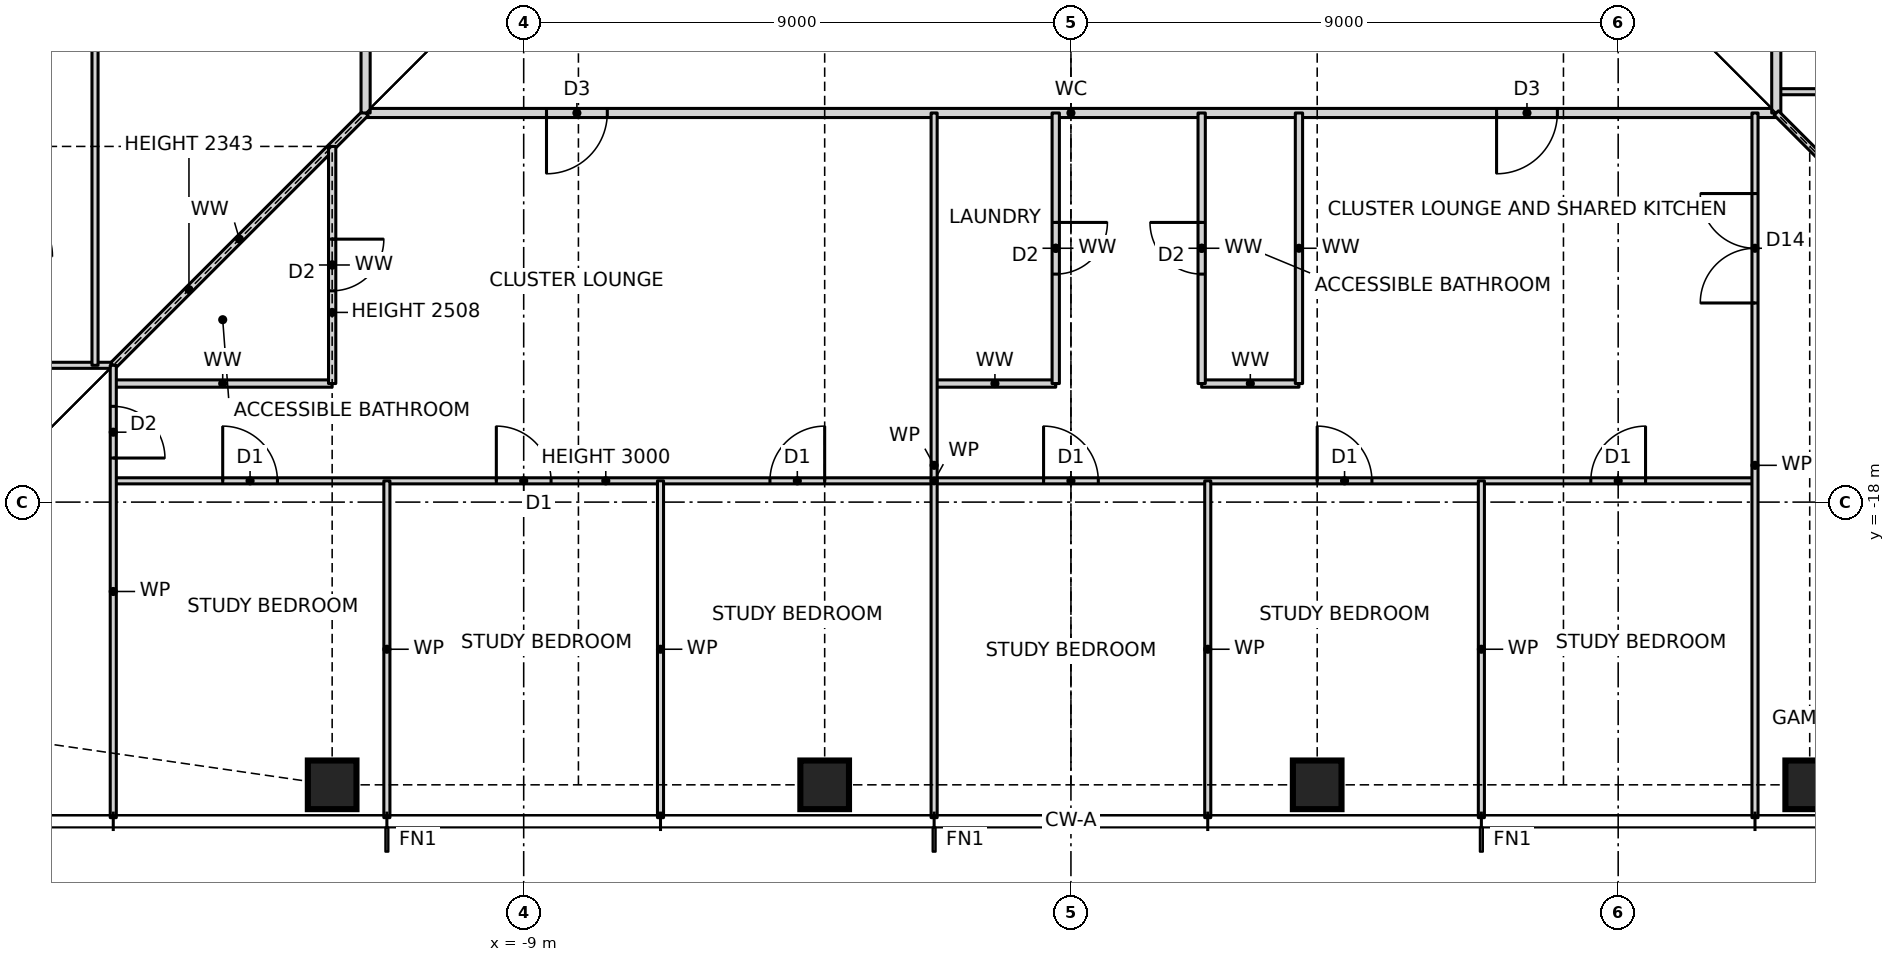
"""IFC4 building model, lengths in metres.
Left out: names, types, materials, properties, quantities, classifications, styles, units other than length and angle.
Written with IfcOpenShell. Run it as: python <this file> out.ifc"""

import sys

from ifc_helpers import new_model, si_unit, direction, frame, frame_2d, origin, origin_2d, place, context, subcontext, project, spatial, rectangle, hollow_rectangle, extrude, element, fill, save


model = new_model("IFC4")
c1 = context("Model", 3, precision=1e-05, world=origin(), true_north=direction((0.0, 1.0)))
c2 = subcontext(c1, "Body", "Model", "MODEL_VIEW")
j1 = project(units=[si_unit("LENGTHUNIT", "METRE"), si_unit("PLANEANGLEUNIT", "RADIAN")], contexts=[c1])
p1 = place(None, origin())
s1 = spatial("IfcSite", under=j1, at=p1, CompositionType="ELEMENT")
p2 = place(p1, origin())
s2 = spatial("IfcBuilding", under=s1, at=p2, CompositionType="ELEMENT")
p3 = place(p2, frame((0.0, 0.0, 43.0)))
s3 = spatial("IfcBuildingStorey", under=s2, at=p3, CompositionType="ELEMENT", Elevation=43.0)
for number, where, z_axis, x_axis in (
    (1, (-12.15, -22.65, 0.0), (0.0, 0.0, 1.0), (1.0, 0.0, 0.0)),
    (2, (-4.05, -22.65, 0.0), (0.0, 0.0, 1.0), (1.0, 0.0, 0.0)),
    (3, (4.05, -22.65, 0.0), (0.0, 0.0, 1.0), (1.0, 0.0, 0.0)),
    (4, (12.15, -22.65, 0.0), (0.0, 0.0, 1.0), (1.0, 0.0, 0.0)),
):
    element("IfcColumn", number, at=place(p3, frame(where, z_axis=z_axis, x_axis=x_axis)), inside=s3, PredefinedType="COLUMN", context=c2, shape_type="SweptSolid", body=[
        extrude(hollow_rectangle(XDim=0.8, YDim=0.8, WallThickness=0.09, at=origin_2d()), origin(), (0.0, 0.0, 1.0), 3.5),
    ])
p4 = place(p3, frame((-15.75, -17.65, 0.0), z_axis=(0.0, 0.0, 1.0), x_axis=(1.0, 0.0, 0.0)))
e5 = element("IfcWall", 5, at=p4, inside=s3, PredefinedType="PARTITIONING", context=c2, shape_type="SweptSolid", body=[
    extrude(rectangle(XDim=27.0, YDim=0.1, at=frame_2d((13.5, 0.0))), origin(), (0.0, 0.0, 1.0), 3.0),
])
p5 = place(p4, frame((1.8, 0.0, 0.0)))
e6 = element("IfcOpeningElement", 6, at=p5, cuts=e5, PredefinedType="OPENING", context=c2, shape_type="SweptSolid", body=[
    extrude(rectangle(XDim=0.9, YDim=2.1, at=frame_2d((0.45, 1.05))), frame((0.0, 0.06, 0.0), z_axis=(0.0, -1.0, 0.0), x_axis=(1.0, 0.0, 0.0)), (0.0, 0.0, 1.0), 0.12),
])
p6 = place(p4, frame((6.3, 0.0, 0.0)))
e7 = element("IfcOpeningElement", 7, at=p6, cuts=e5, PredefinedType="OPENING", context=c2, shape_type="SweptSolid", body=[
    extrude(rectangle(XDim=0.9, YDim=2.1, at=frame_2d((0.45, 1.05))), frame((0.0, 0.06, 0.0), z_axis=(0.0, -1.0, 0.0), x_axis=(1.0, 0.0, 0.0)), (0.0, 0.0, 1.0), 0.12),
])
p7 = place(p4, frame((10.8, 0.0, 0.0)))
e8 = element("IfcOpeningElement", 8, at=p7, cuts=e5, PredefinedType="OPENING", context=c2, shape_type="SweptSolid", body=[
    extrude(rectangle(XDim=0.9, YDim=2.1, at=frame_2d((0.45, 1.05))), frame((0.0, 0.06, 0.0), z_axis=(0.0, -1.0, 0.0), x_axis=(1.0, 0.0, 0.0)), (0.0, 0.0, 1.0), 0.12),
])
p8 = place(p4, frame((15.3, 0.0, 0.0)))
e9 = element("IfcOpeningElement", 9, at=p8, cuts=e5, PredefinedType="OPENING", context=c2, shape_type="SweptSolid", body=[
    extrude(rectangle(XDim=0.9, YDim=2.1, at=frame_2d((0.45, 1.05))), frame((0.0, 0.06, 0.0), z_axis=(0.0, -1.0, 0.0), x_axis=(1.0, 0.0, 0.0)), (0.0, 0.0, 1.0), 0.12),
])
p9 = place(p4, frame((19.8, 0.0, 0.0)))
e10 = element("IfcOpeningElement", 10, at=p9, cuts=e5, PredefinedType="OPENING", context=c2, shape_type="SweptSolid", body=[
    extrude(rectangle(XDim=0.9, YDim=2.1, at=frame_2d((0.45, 1.05))), frame((0.0, 0.06, 0.0), z_axis=(0.0, -1.0, 0.0), x_axis=(1.0, 0.0, 0.0)), (0.0, 0.0, 1.0), 0.12),
])
p10 = place(p4, frame((24.3, 0.0, 0.0)))
e11 = element("IfcOpeningElement", 11, at=p10, cuts=e5, PredefinedType="OPENING", context=c2, shape_type="SweptSolid", body=[
    extrude(rectangle(XDim=0.9, YDim=2.1, at=frame_2d((0.45, 1.05))), frame((0.0, 0.06, 0.0), z_axis=(0.0, -1.0, 0.0), x_axis=(1.0, 0.0, 0.0)), (0.0, 0.0, 1.0), 0.12),
])
p11 = place(p3, frame((-15.75, -16.05, 0.0), z_axis=(0.0, 0.0, 1.0), x_axis=(1.0, 0.0, 0.0)))
e12 = element("IfcWall", 12, at=p11, inside=s3, PredefinedType="PARTITIONING", context=c2, shape_type="SweptSolid", body=[
    extrude(rectangle(XDim=3.6, YDim=0.12, at=frame_2d((1.8, 0.0))), origin(), (0.0, 0.0, 1.0), 3.27),
])
p12 = place(p3, frame((-2.25, -16.05, 0.0), z_axis=(0.0, 0.0, 1.0), x_axis=(1.0, 0.0, 0.0)))
e13 = element("IfcWall", 13, at=p12, inside=s3, PredefinedType="PARTITIONING", context=c2, shape_type="SweptSolid", body=[
    extrude(rectangle(XDim=2.0, YDim=0.12, at=frame_2d((1.0, 0.0))), origin(), (0.0, 0.0, 1.0), 3.27),
])
p13 = place(p3, frame((2.15, -16.05, 0.0), z_axis=(0.0, 0.0, 1.0), x_axis=(1.0, 0.0, 0.0)))
e14 = element("IfcWall", 14, at=p13, inside=s3, PredefinedType="PARTITIONING", context=c2, shape_type="SweptSolid", body=[
    extrude(rectangle(XDim=1.6, YDim=0.12, at=frame_2d((0.8, 0.0))), origin(), (0.0, 0.0, 1.0), 3.27),
])
p14 = place(p3, frame((-23.19, -15.75, 0.0), z_axis=(0.0, 0.0, 1.0), x_axis=(1.0, 0.0, 0.0)))
e15 = element("IfcWall", 15, at=p14, inside=s3, PredefinedType="PARTITIONING", context=c2, shape_type="SweptSolid", body=[
    extrude(rectangle(XDim=7.44, YDim=0.1, at=frame_2d((3.72, 0.0))), origin(), (0.0, 0.0, 1.0), 3.27),
])
p15 = place(p3, frame((-11.6, -11.6, 0.0), z_axis=(0.0, 0.0, 1.0), x_axis=(1.0, 0.0, 0.0)))
e16 = element("IfcWall", 16, at=p15, inside=s3, PredefinedType="PARTITIONING", context=c2, shape_type="SweptSolid", body=[
    extrude(rectangle(XDim=23.2, YDim=0.15, at=frame_2d((11.6, 0.0))), origin(), (0.0, 0.0, 1.0), 3.27),
])
p16 = place(p15, frame((2.975, 0.0, 0.0)))
e17 = element("IfcOpeningElement", 17, at=p16, cuts=e16, PredefinedType="OPENING", context=c2, shape_type="SweptSolid", body=[
    extrude(rectangle(XDim=1.0, YDim=2.1, at=frame_2d((0.5, 1.05))), frame((0.0, 0.085, 0.0), z_axis=(0.0, -1.0, 0.0), x_axis=(1.0, 0.0, 0.0)), (0.0, 0.0, 1.0), 0.17),
])
p17 = place(p15, frame((18.6, 0.0, 0.0)))
e18 = element("IfcOpeningElement", 18, at=p17, cuts=e16, PredefinedType="OPENING", context=c2, shape_type="SweptSolid", body=[
    extrude(rectangle(XDim=1.0, YDim=2.1, at=frame_2d((0.5, 1.05))), frame((0.0, 0.085, 0.0), z_axis=(0.0, -1.0, 0.0), x_axis=(1.0, 0.0, 0.0)), (0.0, 0.0, 1.0), 0.17),
])
p18 = place(p3, frame((11.6, -11.25, 0.0), z_axis=(0.0, 0.0, 1.0), x_axis=(1.0, 0.0, 0.0)))
e19 = element("IfcWall", 19, at=p18, inside=s3, PredefinedType="PARTITIONING", context=c2, shape_type="SweptSolid", body=[
    extrude(rectangle(XDim=11.59, YDim=0.1, at=frame_2d((5.795, 0.0))), origin(), (0.0, 0.0, 1.0), 3.27),
])
p19 = place(p18, frame((1.325, 0.0, 0.0)))
e20 = element("IfcOpeningElement", 20, at=p19, cuts=e19, PredefinedType="OPENING", context=c2, shape_type="SweptSolid", body=[
    extrude(rectangle(XDim=1.8, YDim=2.1, at=frame_2d((0.9, 1.05))), frame((0.0, 0.06, 0.0), z_axis=(0.0, -1.0, 0.0), x_axis=(1.0, 0.0, 0.0)), (0.0, 0.0, 1.0), 0.12),
])
p20 = place(p3, frame((-15.75, -15.75, 0.0), z_axis=(0.0, 0.0, 1.0), x_axis=(0.707106781187, 0.707106781187, 0.0)))
e21 = element("IfcWall", 21, at=p20, inside=s3, PredefinedType="PARTITIONING", context=c2, shape_type="SweptSolid", body=[
    extrude(rectangle(XDim=5.869, YDim=0.12, at=frame_2d((2.935, 0.0))), origin(), (0.0, 0.0, 1.0), 2.343),
])
p21 = place(p3, frame((11.6, -11.6, 0.0), z_axis=(0.0, 0.0, 1.0), x_axis=(0.0, 1.0, 0.0)))
e22 = element("IfcWall", 22, at=p21, inside=s3, PredefinedType="PARTITIONING", context=c2, shape_type="SweptSolid", body=[
    extrude(rectangle(XDim=24.2, YDim=0.15, at=frame_2d((12.1, 0.0))), origin(), (0.0, 0.0, 1.0), 3.27),
])
p22 = place(p21, frame((3.6, 0.0, 0.0)))
e23 = element("IfcOpeningElement", 23, at=p22, cuts=e22, PredefinedType="OPENING", context=c2, shape_type="SweptSolid", body=[
    extrude(rectangle(XDim=1.0, YDim=2.1, at=frame_2d((0.5, 1.05))), frame((0.0, 0.085, 0.0), z_axis=(0.0, -1.0, 0.0), x_axis=(1.0, 0.0, 0.0)), (0.0, 0.0, 1.0), 0.17),
])
p23 = place(p21, frame((21.025, 0.0, 0.0)))
e24 = element("IfcOpeningElement", 24, at=p23, cuts=e22, PredefinedType="OPENING", context=c2, shape_type="SweptSolid", body=[
    extrude(rectangle(XDim=1.0, YDim=2.1, at=frame_2d((0.5, 1.05))), frame((0.0, 0.085, 0.0), z_axis=(0.0, -1.0, 0.0), x_axis=(1.0, 0.0, 0.0)), (0.0, 0.0, 1.0), 0.17),
])
p24 = place(p3, frame((11.25, -23.19, 0.0), z_axis=(0.0, 0.0, 1.0), x_axis=(0.0, 1.0, 0.0)))
e25 = element("IfcWall", 25, at=p24, inside=s3, PredefinedType="PARTITIONING", context=c2, shape_type="SweptSolid", body=[
    extrude(rectangle(XDim=11.59, YDim=0.1, at=frame_2d((5.795, 0.0))), origin(), (0.0, 0.0, 1.0), 3.27),
])
p25 = place(p24, frame((8.465, 0.0, 0.0)))
e26 = element("IfcOpeningElement", 26, at=p25, cuts=e25, PredefinedType="OPENING", context=c2, shape_type="SweptSolid", body=[
    extrude(rectangle(XDim=1.8, YDim=2.1, at=frame_2d((0.9, 1.05))), frame((0.0, 0.06, 0.0), z_axis=(0.0, -1.0, 0.0), x_axis=(1.0, 0.0, 0.0)), (0.0, 0.0, 1.0), 0.12),
])
p26 = place(p3, frame((6.75, -23.19, 0.0), z_axis=(0.0, 0.0, 1.0), x_axis=(0.0, 1.0, 0.0)))
e27 = element("IfcWall", 27, at=p26, inside=s3, PredefinedType="PARTITIONING", context=c2, shape_type="SweptSolid", body=[
    extrude(rectangle(XDim=5.54, YDim=0.1, at=frame_2d((2.77, 0.0))), origin(), (0.0, 0.0, 1.0), 3.27),
])
p27 = place(p3, frame((3.75, -16.05, 0.0), z_axis=(0.0, 0.0, 1.0), x_axis=(0.0, 1.0, 0.0)))
e28 = element("IfcWall", 28, at=p27, inside=s3, PredefinedType="PARTITIONING", context=c2, shape_type="SweptSolid", body=[
    extrude(rectangle(XDim=4.45, YDim=0.12, at=frame_2d((2.225, 0.0))), origin(), (0.0, 0.0, 1.0), 3.27),
])
p28 = place(p3, frame((2.25, -23.19, 0.0), z_axis=(0.0, 0.0, 1.0), x_axis=(0.0, 1.0, 0.0)))
e29 = element("IfcWall", 29, at=p28, inside=s3, PredefinedType="PARTITIONING", context=c2, shape_type="SweptSolid", body=[
    extrude(rectangle(XDim=5.54, YDim=0.1, at=frame_2d((2.77, 0.0))), origin(), (0.0, 0.0, 1.0), 3.27),
])
p29 = place(p3, frame((2.15, -16.05, 0.0), z_axis=(0.0, 0.0, 1.0), x_axis=(0.0, 1.0, 0.0)))
e30 = element("IfcWall", 30, at=p29, inside=s3, PredefinedType="PARTITIONING", context=c2, shape_type="SweptSolid", body=[
    extrude(rectangle(XDim=4.45, YDim=0.12, at=frame_2d((2.225, 0.0))), origin(), (0.0, 0.0, 1.0), 3.27),
])
p30 = place(p29, frame((1.8, 0.0, 0.0)))
e31 = element("IfcOpeningElement", 31, at=p30, cuts=e30, PredefinedType="OPENING", context=c2, shape_type="SweptSolid", body=[
    extrude(rectangle(XDim=0.85, YDim=2.1, at=frame_2d((0.425, 1.05))), frame((0.0, 0.07, 0.0), z_axis=(0.0, -1.0, 0.0), x_axis=(1.0, 0.0, 0.0)), (0.0, 0.0, 1.0), 0.14),
])
p31 = place(p3, frame((-0.25, -16.05, 0.0), z_axis=(0.0, 0.0, 1.0), x_axis=(0.0, 1.0, 0.0)))
e32 = element("IfcWall", 32, at=p31, inside=s3, PredefinedType="PARTITIONING", context=c2, shape_type="SweptSolid", body=[
    extrude(rectangle(XDim=4.45, YDim=0.12, at=frame_2d((2.225, 0.0))), origin(), (0.0, 0.0, 1.0), 3.27),
])
p32 = place(p31, frame((1.8, 0.0, 0.0)))
e33 = element("IfcOpeningElement", 33, at=p32, cuts=e32, PredefinedType="OPENING", context=c2, shape_type="SweptSolid", body=[
    extrude(rectangle(XDim=0.85, YDim=2.1, at=frame_2d((0.425, 1.05))), frame((0.0, 0.07, 0.0), z_axis=(0.0, -1.0, 0.0), x_axis=(1.0, 0.0, 0.0)), (0.0, 0.0, 1.0), 0.14),
])
p33 = place(p3, frame((-2.25, -23.19, 0.0), z_axis=(0.0, 0.0, 1.0), x_axis=(0.0, 1.0, 0.0)))
e34 = element("IfcWall", 34, at=p33, inside=s3, PredefinedType="PARTITIONING", context=c2, shape_type="SweptSolid", body=[
    extrude(rectangle(XDim=11.59, YDim=0.1, at=frame_2d((5.795, 0.0))), origin(), (0.0, 0.0, 1.0), 3.27),
])
for number, where, z_axis, x_axis in (
    (35, (-6.75, -23.19, 0.0), (0.0, 0.0, 1.0), (0.0, 1.0, 0.0)),
    (36, (-11.25, -23.19, 0.0), (0.0, 0.0, 1.0), (0.0, 1.0, 0.0)),
):
    element("IfcWall", number, at=place(p3, frame(where, z_axis=z_axis, x_axis=x_axis)), inside=s3, PredefinedType="PARTITIONING", context=c2, shape_type="SweptSolid", body=[
        extrude(rectangle(XDim=5.54, YDim=0.1, at=frame_2d((2.77, 0.0))), origin(), (0.0, 0.0, 1.0), 3.27),
    ])
p34 = place(p3, frame((-11.6, -11.6, 0.0), z_axis=(0.0, 0.0, 1.0), x_axis=(0.0, 1.0, 0.0)))
e37 = element("IfcWall", 37, at=p34, inside=s3, PredefinedType="PARTITIONING", context=c2, shape_type="SweptSolid", body=[
    extrude(rectangle(XDim=24.2, YDim=0.15, at=frame_2d((12.1, 0.0))), origin(), (0.0, 0.0, 1.0), 3.27),
])
p35 = place(p34, frame((12.14, 0.0, 0.0)))
e38 = element("IfcOpeningElement", 38, at=p35, cuts=e37, PredefinedType="OPENING", context=c2, shape_type="SweptSolid", body=[
    extrude(rectangle(XDim=1.0, YDim=2.1, at=frame_2d((0.5, 1.05))), frame((0.0, 0.085, 0.0), z_axis=(0.0, -1.0, 0.0), x_axis=(1.0, 0.0, 0.0)), (0.0, 0.0, 1.0), 0.17),
])
p36 = place(p3, frame((-12.15, -16.05, 0.0), z_axis=(0.0, 0.0, 1.0), x_axis=(0.0, 1.0, 0.0)))
e39 = element("IfcWall", 39, at=p36, inside=s3, PredefinedType="PARTITIONING", context=c2, shape_type="SweptSolid", body=[
    extrude(rectangle(XDim=3.9, YDim=0.12, at=frame_2d((1.95, 0.0))), origin(), (0.0, 0.0, 1.0), 2.508),
])
p37 = place(p36, frame((1.525, 0.0, 0.0)))
e40 = element("IfcOpeningElement", 40, at=p37, cuts=e39, PredefinedType="OPENING", context=c2, shape_type="SweptSolid", body=[
    extrude(rectangle(XDim=0.85, YDim=2.1, at=frame_2d((0.425, 1.05))), frame((0.0, 0.07, 0.0), z_axis=(0.0, -1.0, 0.0), x_axis=(1.0, 0.0, 0.0)), (0.0, 0.0, 1.0), 0.14),
])
p38 = place(p3, frame((-15.75, -23.19, 0.0), z_axis=(0.0, 0.0, 1.0), x_axis=(0.0, 1.0, 0.0)))
e41 = element("IfcWall", 41, at=p38, inside=s3, PredefinedType="PARTITIONING", context=c2, shape_type="SweptSolid", body=[
    extrude(rectangle(XDim=7.44, YDim=0.1, at=frame_2d((3.72, 0.0))), origin(), (0.0, 0.0, 1.0), 3.27),
])
p39 = place(p38, frame((5.915, 0.0, 0.0)))
e42 = element("IfcOpeningElement", 42, at=p39, cuts=e41, PredefinedType="OPENING", context=c2, shape_type="SweptSolid", body=[
    extrude(rectangle(XDim=0.85, YDim=2.1, at=frame_2d((0.425, 1.05))), frame((0.0, 0.06, 0.0), z_axis=(0.0, -1.0, 0.0), x_axis=(1.0, 0.0, 0.0)), (0.0, 0.0, 1.0), 0.12),
])
p40 = place(p3, frame((-16.05, -15.75, 0.0), z_axis=(0.0, 0.0, 1.0), x_axis=(0.0, 1.0, 0.0)))
e43 = element("IfcWall", 43, at=p40, inside=s3, PredefinedType="PARTITIONING", context=c2, shape_type="SweptSolid", body=[
    extrude(rectangle(XDim=14.08, YDim=0.1, at=frame_2d((7.04, 0.0))), origin(), (0.0, 0.0, 1.0), 3.27),
])
p41 = place(p40, frame((6.615, 0.0, 0.0)))
e44 = element("IfcOpeningElement", 44, at=p41, cuts=e43, PredefinedType="OPENING", context=c2, shape_type="SweptSolid", body=[
    extrude(rectangle(XDim=0.85, YDim=2.1, at=frame_2d((0.425, 1.05))), frame((0.0, 0.06, 0.0), z_axis=(0.0, -1.0, 0.0), x_axis=(1.0, 0.0, 0.0)), (0.0, 0.0, 1.0), 0.12),
])
p42 = place(p3, frame((15.75, -15.75, 0.0), z_axis=(0.0, 0.0, 1.0), x_axis=(-0.707106781187, 0.707106781187, 0.0)))
e45 = element("IfcWall", 45, at=p42, inside=s3, PredefinedType="PARTITIONING", context=c2, shape_type="SweptSolid", body=[
    extrude(rectangle(XDim=5.869, YDim=0.1, at=frame_2d((2.935, 0.0))), origin(), (0.0, 0.0, 1.0), 2.343),
])
p43 = place(p5, origin())
e46 = element("IfcDoor", 46, at=p43, inside=s3, OperationType="SINGLE_SWING_LEFT", PredefinedType="DOOR", context=c2, shape_type="SweptSolid", body=[
    extrude(rectangle(XDim=0.9, YDim=2.1, at=frame_2d((0.45, 1.05))), frame((0.0, 0.025, 0.0), z_axis=(0.0, -1.0, 0.0), x_axis=(1.0, 0.0, 0.0)), (0.0, 0.0, 1.0), 0.05),
])
fill(e6, e46)
p44 = place(p6, origin())
e47 = element("IfcDoor", 47, at=p44, inside=s3, OperationType="SINGLE_SWING_LEFT", PredefinedType="DOOR", context=c2, shape_type="SweptSolid", body=[
    extrude(rectangle(XDim=0.9, YDim=2.1, at=frame_2d((0.45, 1.05))), frame((0.0, 0.025, 0.0), z_axis=(0.0, -1.0, 0.0), x_axis=(1.0, 0.0, 0.0)), (0.0, 0.0, 1.0), 0.05),
])
fill(e7, e47)
p45 = place(p7, origin())
e48 = element("IfcDoor", 48, at=p45, inside=s3, OperationType="SINGLE_SWING_RIGHT", PredefinedType="DOOR", context=c2, shape_type="SweptSolid", body=[
    extrude(rectangle(XDim=0.9, YDim=2.1, at=frame_2d((0.45, 1.05))), frame((0.0, 0.025, 0.0), z_axis=(0.0, -1.0, 0.0), x_axis=(1.0, 0.0, 0.0)), (0.0, 0.0, 1.0), 0.05),
])
fill(e8, e48)
p46 = place(p16, frame((1.0, 0.0, 0.0), z_axis=(0.0, 0.0, 1.0), x_axis=(-1.0, 0.0, 0.0)))
e49 = element("IfcDoor", 49, at=p46, inside=s3, OperationType="SINGLE_SWING_RIGHT", PredefinedType="DOOR", context=c2, shape_type="SweptSolid", body=[
    extrude(rectangle(XDim=1.0, YDim=2.1, at=frame_2d((0.5, 1.05))), frame((0.0, 0.025, 0.0), z_axis=(0.0, -1.0, 0.0), x_axis=(1.0, 0.0, 0.0)), (0.0, 0.0, 1.0), 0.05),
])
fill(e17, e49)
p47 = place(p37, frame((0.85, 0.0, 0.0), z_axis=(0.0, 0.0, 1.0), x_axis=(-1.0, 0.0, 0.0)))
e50 = element("IfcDoor", 50, at=p47, inside=s3, OperationType="SINGLE_SWING_LEFT", PredefinedType="DOOR", context=c2, shape_type="SweptSolid", body=[
    extrude(rectangle(XDim=0.85, YDim=2.1, at=frame_2d((0.425, 1.05))), frame((0.0, 0.025, 0.0), z_axis=(0.0, -1.0, 0.0), x_axis=(1.0, 0.0, 0.0)), (0.0, 0.0, 1.0), 0.05),
])
fill(e40, e50)
p48 = place(p8, origin())
e51 = element("IfcDoor", 51, at=p48, inside=s3, OperationType="SINGLE_SWING_LEFT", PredefinedType="DOOR", context=c2, shape_type="SweptSolid", body=[
    extrude(rectangle(XDim=0.9, YDim=2.1, at=frame_2d((0.45, 1.05))), frame((0.0, 0.025, 0.0), z_axis=(0.0, -1.0, 0.0), x_axis=(1.0, 0.0, 0.0)), (0.0, 0.0, 1.0), 0.05),
])
fill(e9, e51)
p49 = place(p9, origin())
e52 = element("IfcDoor", 52, at=p49, inside=s3, OperationType="SINGLE_SWING_LEFT", PredefinedType="DOOR", context=c2, shape_type="SweptSolid", body=[
    extrude(rectangle(XDim=0.9, YDim=2.1, at=frame_2d((0.45, 1.05))), frame((0.0, 0.025, 0.0), z_axis=(0.0, -1.0, 0.0), x_axis=(1.0, 0.0, 0.0)), (0.0, 0.0, 1.0), 0.05),
])
fill(e10, e52)
p50 = place(p10, origin())
e53 = element("IfcDoor", 53, at=p50, inside=s3, OperationType="SINGLE_SWING_RIGHT", PredefinedType="DOOR", context=c2, shape_type="SweptSolid", body=[
    extrude(rectangle(XDim=0.9, YDim=2.1, at=frame_2d((0.45, 1.05))), frame((0.0, 0.025, 0.0), z_axis=(0.0, -1.0, 0.0), x_axis=(1.0, 0.0, 0.0)), (0.0, 0.0, 1.0), 0.05),
])
fill(e11, e53)
p51 = place(p17, frame((1.0, 0.0, 0.0), z_axis=(0.0, 0.0, 1.0), x_axis=(-1.0, 0.0, 0.0)))
e54 = element("IfcDoor", 54, at=p51, inside=s3, OperationType="SINGLE_SWING_RIGHT", PredefinedType="DOOR", context=c2, shape_type="SweptSolid", body=[
    extrude(rectangle(XDim=1.0, YDim=2.1, at=frame_2d((0.5, 1.05))), frame((0.0, 0.025, 0.0), z_axis=(0.0, -1.0, 0.0), x_axis=(1.0, 0.0, 0.0)), (0.0, 0.0, 1.0), 0.05),
])
fill(e18, e54)
p52 = place(p32, frame((0.85, 0.0, 0.0), z_axis=(0.0, 0.0, 1.0), x_axis=(-1.0, 0.0, 0.0)))
e55 = element("IfcDoor", 55, at=p52, inside=s3, OperationType="SINGLE_SWING_LEFT", PredefinedType="DOOR", context=c2, shape_type="SweptSolid", body=[
    extrude(rectangle(XDim=0.85, YDim=2.1, at=frame_2d((0.425, 1.05))), frame((0.0, 0.025, 0.0), z_axis=(0.0, -1.0, 0.0), x_axis=(1.0, 0.0, 0.0)), (0.0, 0.0, 1.0), 0.05),
])
fill(e33, e55)
p53 = place(p30, origin())
e56 = element("IfcDoor", 56, at=p53, inside=s3, OperationType="SINGLE_SWING_RIGHT", PredefinedType="DOOR", context=c2, shape_type="SweptSolid", body=[
    extrude(rectangle(XDim=0.85, YDim=2.1, at=frame_2d((0.425, 1.05))), frame((0.0, 0.025, 0.0), z_axis=(0.0, -1.0, 0.0), x_axis=(1.0, 0.0, 0.0)), (0.0, 0.0, 1.0), 0.05),
])
fill(e31, e56)
p54 = place(p25, origin())
e57 = element("IfcDoor", 57, at=p54, inside=s3, OperationType="DOUBLE_DOOR_SINGLE_SWING", PredefinedType="DOOR", context=c2, shape_type="SweptSolid", body=[
    extrude(rectangle(XDim=1.8, YDim=2.1, at=frame_2d((0.9, 1.05))), frame((0.0, 0.025, 0.0), z_axis=(0.0, -1.0, 0.0), x_axis=(1.0, 0.0, 0.0)), (0.0, 0.0, 1.0), 0.05),
])
fill(e26, e57)
p55 = place(p39, frame((0.85, 0.0, 0.0), z_axis=(0.0, 0.0, 1.0), x_axis=(-1.0, 0.0, 0.0)))
e58 = element("IfcDoor", 58, at=p55, inside=s3, OperationType="SINGLE_SWING_RIGHT", PredefinedType="DOOR", context=c2, shape_type="SweptSolid", body=[
    extrude(rectangle(XDim=0.85, YDim=2.1, at=frame_2d((0.425, 1.05))), frame((0.0, 0.025, 0.0), z_axis=(0.0, -1.0, 0.0), x_axis=(1.0, 0.0, 0.0)), (0.0, 0.0, 1.0), 0.05),
])
fill(e42, e58)
save(model, sys.argv[1])
